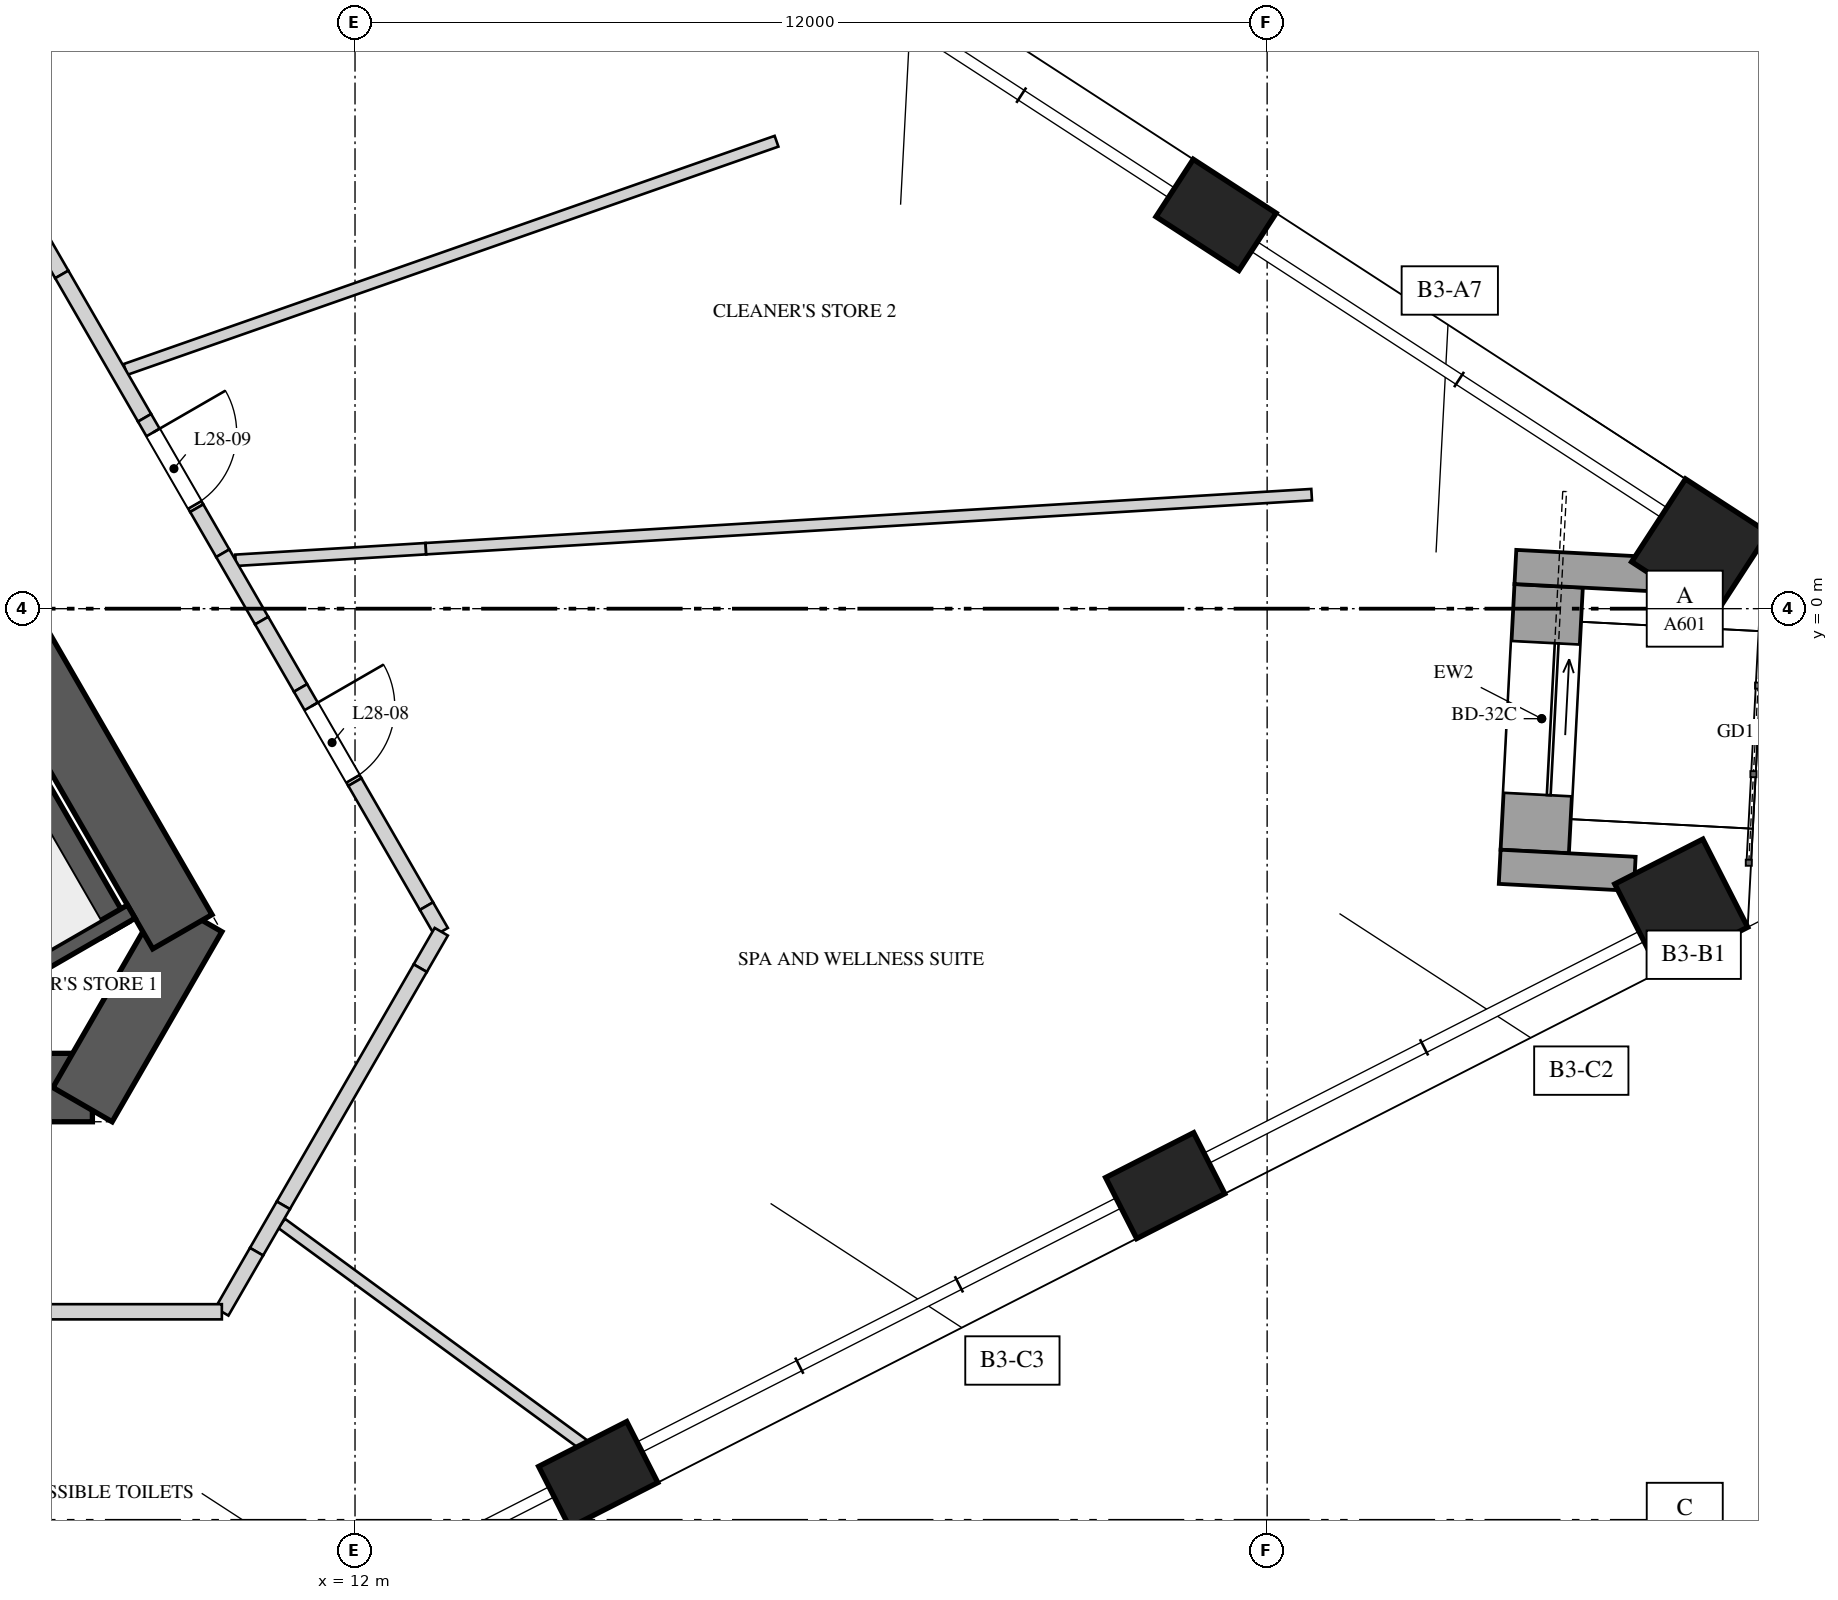
"""IFC4 building model, lengths in metres.
Left out: names, types, materials, properties, quantities, classifications, styles, units other than length and angle.
Written with IfcOpenShell. Run it as: python <this file> out.ifc"""

import sys

from ifc_helpers import new_model, si_unit, direction, frame, frame_2d, origin, origin_2d, place, context, subcontext, project, spatial, polyline, rectangle, outline, extrude, element, fill, save


model = new_model("IFC4")
c1 = context("Model", 3, precision=1e-05, world=origin(), true_north=direction((0.0, 1.0)))
c2 = subcontext(c1, "Body", "Model", "MODEL_VIEW")
j1 = project(units=[si_unit("LENGTHUNIT", "METRE"), si_unit("PLANEANGLEUNIT", "RADIAN")], contexts=[c1])
p1 = place(None, origin())
s1 = spatial("IfcSite", under=j1, at=p1, CompositionType="ELEMENT")
p2 = place(p1, origin())
s2 = spatial("IfcBuilding", under=s1, at=p2, CompositionType="ELEMENT")
p3 = place(p2, frame((0.0, 0.0, 125.6)))
s3 = spatial("IfcBuildingStorey", under=s2, at=p3, CompositionType="ELEMENT", Elevation=125.6)
p4 = place(p3, frame((-8.545, -6.3, 0.0), z_axis=(0.0, 0.0, 1.0), x_axis=(1.0, 0.0, 0.0)))
e1 = element("IfcWall", 1, at=p4, inside=s3, PredefinedType="SHEAR", context=c2, shape_type="SweptSolid", body=[
    extrude(rectangle(XDim=17.09, YDim=0.9, at=frame_2d((8.545, 0.0))), origin(), (0.0, 0.0, 1.0), 4.0),
])
p5 = place(p4, frame((6.75, 0.0, 0.0)))
e2 = element("IfcOpeningElement", 2, at=p5, cuts=e1, PredefinedType="OPENING", context=c2, shape_type="SweptSolid", body=[
    extrude(rectangle(XDim=1.0, YDim=2.4, at=frame_2d((0.5, 1.2))), frame((0.0, 0.46, 0.0), z_axis=(0.0, -1.0, 0.0), x_axis=(1.0, 0.0, 0.0)), (0.0, 0.0, 1.0), 0.92),
])
p6 = place(p4, frame((14.678, 0.0, 0.0)))
e3 = element("IfcOpeningElement", 3, at=p6, cuts=e1, PredefinedType="OPENING", context=c2, shape_type="SweptSolid", body=[
    extrude(rectangle(XDim=0.8, YDim=2.1, at=frame_2d((0.4, 1.05))), frame((0.0, 0.46, 0.0), z_axis=(0.0, -1.0, 0.0), x_axis=(1.0, 0.0, 0.0)), (0.0, 0.0, 1.0), 0.92),
])
p7 = place(p3, frame((8.415, -6.525, 0.0), z_axis=(0.0, 0.0, 1.0), x_axis=(0.500059191753, 0.865991226713, 0.0)))
e4 = element("IfcWall", 4, at=p7, inside=s3, PredefinedType="SHEAR", context=c2, shape_type="SweptSolid", body=[
    extrude(rectangle(XDim=2.887, YDim=0.9, at=frame_2d((1.443, 0.0))), origin(), (0.0, 0.0, 1.0), 4.0),
])
p8 = place(p3, frame((9.729, -4.25, 0.0), z_axis=(0.0, 0.0, 1.0), x_axis=(-0.500004814304, 0.866022624227, 0.0)))
e5 = element("IfcWall", 5, at=p8, inside=s3, PredefinedType="SHEAR", context=c2, shape_type="SweptSolid", body=[
    extrude(rectangle(XDim=17.09, YDim=0.9, at=frame_2d((8.545, 0.0))), origin(), (0.0, 0.0, 1.0), 4.0),
])
p9 = place(p8, frame((6.82, 0.0, 0.0)))
e6 = element("IfcOpeningElement", 6, at=p9, cuts=e5, PredefinedType="OPENING", context=c2, shape_type="SweptSolid", body=[
    extrude(rectangle(XDim=1.0, YDim=2.4, at=frame_2d((0.5, 1.2))), frame((0.0, 0.46, 0.0), z_axis=(0.0, -1.0, 0.0), x_axis=(1.0, 0.0, 0.0)), (0.0, 0.0, 1.0), 0.92),
])
for number, where, z_axis, x_axis in (
    (7, (15.2, -11.391, -0.35), (0.0, 0.0, 1.0), (0.891, 0.454, 0.0)),
    (8, (22.659, -7.59, -0.35), (0.0, 0.0, 1.0), (0.891, 0.454, 0.0)),
):
    element("IfcColumn", number, at=place(p3, frame(where, z_axis=z_axis, x_axis=x_axis)), inside=s3, PredefinedType="COLUMN", context=c2, shape_type="SweptSolid", body=[
        extrude(rectangle(XDim=1.3, YDim=0.9, at=origin_2d()), origin(), (0.0, 0.0, 1.0), 4.35),
    ])
for number, where, z_axis, x_axis in (
    (9, (29.448, -3.907, -0.35), (0.0, 0.0, 1.0), (0.891, 0.454, 0.0)),
    (10, (29.695, 0.807, -0.35), (0.0, 0.0, 1.0), (-0.839, 0.545, 0.0)),
):
    element("IfcColumn", number, at=place(p3, frame(where, z_axis=z_axis, x_axis=x_axis)), inside=s3, PredefinedType="COLUMN", context=c2, shape_type="SweptSolid", body=[
        extrude(rectangle(XDim=1.3, YDim=1.3, at=origin_2d()), origin(), (0.0, 0.0, 1.0), 4.35),
    ])
p10 = place(p3, frame((23.328, 5.18, -0.35), z_axis=(0.0, 0.0, 1.0), x_axis=(-0.838670567945, 0.544639035015, 0.0)))
e11 = element("IfcColumn", 11, at=p10, inside=s3, PredefinedType="COLUMN", context=c2, shape_type="SweptSolid", body=[
    extrude(rectangle(XDim=1.3, YDim=0.9, at=origin_2d()), origin(), (0.0, 0.0, 1.0), 4.35),
])
p11 = place(p3, frame((27.704, 0.301, 0.0), z_axis=(0.0, 0.0, 1.0), x_axis=(-0.052317189757, -0.998630518088, 0.0)))
e12 = element("IfcWall", 12, at=p11, inside=s3, PredefinedType="SOLIDWALL", context=c2, shape_type="SweptSolid", body=[
    extrude(rectangle(XDim=3.5, YDim=0.9, at=frame_2d((1.75, 0.0))), origin(), (0.0, 0.0, 1.0), 3.3),
])
p12 = place(p11, frame((0.75, 0.0, 0.0)))
e13 = element("IfcOpeningElement", 13, at=p12, cuts=e12, PredefinedType="OPENING", context=c2, shape_type="SweptSolid", body=[
    extrude(rectangle(XDim=2.0, YDim=2.4, at=frame_2d((1.0, 1.2))), frame((0.0, 0.46, 0.0), z_axis=(0.0, -1.0, 0.0), x_axis=(1.0, 0.0, 0.0)), (0.0, 0.0, 1.0), 0.92),
])
for number, where, z_axis, x_axis in (
    (14, (29.043, 0.456, 0.0), (0.0, 0.0, 1.0), (-0.999, 0.052, 0.0)),
    (15, (28.836, -3.489, 0.0), (0.0, 0.0, 1.0), (-0.999, 0.052, 0.0)),
):
    element("IfcWall", number, at=place(p3, frame(where, z_axis=z_axis, x_axis=x_axis)), inside=s3, PredefinedType="SOLIDWALL", context=c2, shape_type="SweptSolid", body=[
        extrude(rectangle(XDim=1.779, YDim=0.45, at=frame_2d((0.89, 0.0))), origin(), (0.0, 0.0, 1.0), 2.55),
    ])
p13 = place(p3, frame((8.846, -4.222, 0.0), z_axis=(0.0, 0.0, 1.0), x_axis=(-0.500009909098, 0.866019682689, 0.0)))
e16 = element("IfcWall", 16, at=p13, inside=s3, PredefinedType="SOLIDWALL", context=c2, shape_type="SweptSolid", body=[
    extrude(rectangle(XDim=6.2, YDim=0.4, at=frame_2d((3.1, 0.0))), origin(), (0.0, 0.0, 1.0), 3.65),
])
p14 = place(p3, frame((6.501, -5.461, 0.0), z_axis=(0.0, 0.0, 1.0), x_axis=(0.866003658127, 0.500037662692, 0.0)))
e17 = element("IfcWall", 17, at=p14, inside=s3, PredefinedType="SOLIDWALL", context=c2, shape_type="SweptSolid", body=[
    extrude(rectangle(XDim=2.95, YDim=0.2, at=frame_2d((1.475, 0.0))), origin(), (0.0, 0.0, 1.0), 3.65),
])
p15 = place(p3, frame((10.429, 0.636, 0.0), z_axis=(0.0, 0.0, 1.0), x_axis=(0.998147237078, 0.060844828165, 0.0)))
e18 = element("IfcWall", 18, at=p15, inside=s3, PredefinedType="PARTITIONING", context=c2, shape_type="SweptSolid", body=[
    extrude(rectangle(XDim=2.508, YDim=0.15, at=frame_2d((1.254, 0.0))), origin(), (0.0, 0.0, 1.0), 2.55),
])
p16 = place(p3, frame((12.932, 0.789, 0.0), z_axis=(0.0, 0.0, 1.0), x_axis=(0.998142962619, 0.060914909287, 0.0)))
e19 = element("IfcWall", 19, at=p16, inside=s3, PredefinedType="PARTITIONING", context=c2, shape_type="SweptSolid", body=[
    extrude(rectangle(XDim=11.675, YDim=0.15, at=frame_2d((5.837, 0.0))), origin(), (0.0, 0.0, 1.0), 3.65),
])
p17 = place(p3, frame((11.035, -8.087, 0.0), z_axis=(0.0, 0.0, 1.0), x_axis=(0.806587239444, -0.591115069311, 0.0)))
e20 = element("IfcWall", 20, at=p17, inside=s3, PredefinedType="PARTITIONING", context=c2, shape_type="SweptSolid", body=[
    extrude(rectangle(XDim=5.28, YDim=0.15, at=frame_2d((2.64, 0.0))), origin(), (0.0, 0.0, 1.0), 2.95),
])
p18 = place(p3, frame((17.545, 6.149, 0.0), z_axis=(0.0, 0.0, 1.0), x_axis=(-0.943716534822, -0.33075535053, 0.0)))
e21 = element("IfcWall", 21, at=p18, inside=s3, PredefinedType="PARTITIONING", context=c2, shape_type="SweptSolid", body=[
    extrude(rectangle(XDim=9.077, YDim=0.15, at=frame_2d((4.539, 0.0))), origin(), (0.0, 0.0, 1.0), 3.65),
])
p19 = place(p3, frame((7.742, 5.09, 0.0), z_axis=(0.0, 0.0, 1.0), x_axis=(0.500109828528, -0.865961984968, 0.0)))
e22 = element("IfcWall", 22, at=p19, inside=s3, PredefinedType="SOLIDWALL", context=c2, shape_type="SweptSolid", body=[
    extrude(rectangle(XDim=0.8, YDim=0.2, at=frame_2d((0.4, 0.0))), origin(), (0.0, 0.0, 1.0), 2.75),
])
p20 = place(p3, frame((8.142, 4.397, 0.0), z_axis=(0.0, 0.0, 1.0), x_axis=(0.499948868167, -0.866054922749, 0.0)))
e23 = element("IfcWall", 23, at=p20, inside=s3, PredefinedType="SOLIDWALL", context=c2, shape_type="SweptSolid", body=[
    extrude(rectangle(XDim=2.178, YDim=0.2, at=frame_2d((1.089, 0.0))), origin(), (0.0, 0.0, 1.0), 3.65),
])
p21 = place(p3, frame((9.231, 2.511, 0.0), z_axis=(0.0, 0.0, 1.0), x_axis=(0.49998419723, -0.866034527326, 0.0)))
e24 = element("IfcWall", 24, at=p21, inside=s3, PredefinedType="SOLIDWALL", context=c2, shape_type="SweptSolid", body=[
    extrude(outline(polyline([(0.0, 0.0), (1.373, 0.0), (1.373, 3.65), (0.944, 3.65), (0.944, 2.55), (0.0, 2.55), (0.0, 0.0)])), frame((0.0, 0.1, 0.0), z_axis=(0.0, -1.0, 0.0), x_axis=(1.0, 0.0, 0.0)), (0.0, 0.0, 1.0), 0.2),
])
p22 = place(p21, frame((0.223, 0.0, 0.0)))
e25 = element("IfcOpeningElement", 25, at=p22, cuts=e24, PredefinedType="OPENING", context=c2, shape_type="SweptSolid", body=[
    extrude(rectangle(XDim=1.1, YDim=2.4, at=frame_2d((0.55, 1.2))), frame((0.0, 0.11, 0.0), z_axis=(0.0, -1.0, 0.0), x_axis=(1.0, 0.0, 0.0)), (0.0, 0.0, 1.0), 0.22),
])
p23 = place(p3, frame((9.917, 1.322, 0.0), z_axis=(0.0, 0.0, 1.0), x_axis=(0.500010383074, -0.866019409031, 0.0)))
e26 = element("IfcWall", 26, at=p23, inside=s3, PredefinedType="SOLIDWALL", context=c2, shape_type="SweptSolid", body=[
    extrude(rectangle(XDim=0.685, YDim=0.2, at=frame_2d((0.343, 0.0))), origin(), (0.0, 0.0, 1.0), 3.65),
])
p24 = place(p3, frame((10.26, 0.729, 0.0), z_axis=(0.0, 0.0, 1.0), x_axis=(0.499935808259, -0.866062461731, 0.0)))
e27 = element("IfcWall", 27, at=p24, inside=s3, PredefinedType="SOLIDWALL", context=c2, shape_type="SweptSolid", body=[
    extrude(rectangle(XDim=1.024, YDim=0.2, at=frame_2d((0.512, 0.0))), origin(), (0.0, 0.0, 1.0), 2.55),
])
p25 = place(p3, frame((10.772, -0.157, 0.0), z_axis=(0.0, 0.0, 1.0), x_axis=(0.500170198676, -0.865927117231, 0.0)))
e28 = element("IfcWall", 28, at=p25, inside=s3, PredefinedType="SOLIDWALL", context=c2, shape_type="SweptSolid", body=[
    extrude(rectangle(XDim=1.023, YDim=0.2, at=frame_2d((0.511, 0.0))), origin(), (0.0, 0.0, 1.0), 3.65),
])
p26 = place(p3, frame((11.283, -1.043, 0.0), z_axis=(0.0, 0.0, 1.0), x_axis=(0.499885022602, -0.86609177584, 0.0)))
e29 = element("IfcWall", 29, at=p26, inside=s3, PredefinedType="SOLIDWALL", context=c2, shape_type="SweptSolid", body=[
    extrude(outline(polyline([(0.0, 0.0), (1.43, 0.0), (1.43, 3.65), (1.135, 3.65), (1.135, 2.55), (0.0, 2.55), (0.0, 0.0)])), frame((0.0, 0.1, 0.0), z_axis=(0.0, -1.0, 0.0), x_axis=(1.0, 0.0, 0.0)), (0.0, 0.0, 1.0), 0.2),
])
p27 = place(p26, frame((0.28, 0.0, 0.0)))
e30 = element("IfcOpeningElement", 30, at=p27, cuts=e29, PredefinedType="OPENING", context=c2, shape_type="SweptSolid", body=[
    extrude(rectangle(XDim=1.1, YDim=2.4, at=frame_2d((0.55, 1.2))), frame((0.0, 0.11, 0.0), z_axis=(0.0, -1.0, 0.0), x_axis=(1.0, 0.0, 0.0)), (0.0, 0.0, 1.0), 0.22),
])
p28 = place(p3, frame((11.998, -2.281, 0.0), z_axis=(0.0, 0.0, 1.0), x_axis=(0.500111335238, -0.865961114812, 0.0)))
e31 = element("IfcWall", 31, at=p28, inside=s3, PredefinedType="SOLIDWALL", context=c2, shape_type="SweptSolid", body=[
    extrude(rectangle(XDim=1.884, YDim=0.2, at=frame_2d((0.942, 0.0))), origin(), (0.0, 0.0, 1.0), 3.65),
])
p29 = place(p3, frame((12.94, -3.913, 0.0), z_axis=(0.0, 0.0, 1.0), x_axis=(0.499849133735, -0.866112488944, 0.0)))
e32 = element("IfcWall", 32, at=p29, inside=s3, PredefinedType="SOLIDWALL", context=c2, shape_type="SweptSolid", body=[
    extrude(rectangle(XDim=0.389, YDim=0.2, at=frame_2d((0.195, 0.0))), origin(), (0.0, 0.0, 1.0), 2.75),
])
p30 = place(p3, frame((13.135, -4.25, 0.0), z_axis=(0.0, 0.0, 1.0), x_axis=(-0.499887958344, -0.866090081402, 0.0)))
e33 = element("IfcWall", 33, at=p30, inside=s3, PredefinedType="SOLIDWALL", context=c2, shape_type="SweptSolid", body=[
    extrude(rectangle(XDim=0.553, YDim=0.2, at=frame_2d((0.277, 0.0))), origin(), (0.0, 0.0, 1.0), 2.75),
])
p31 = place(p3, frame((12.858, -4.729, 0.0), z_axis=(0.0, 0.0, 1.0), x_axis=(-0.500031425827, -0.866007259314, 0.0)))
e34 = element("IfcWall", 34, at=p31, inside=s3, PredefinedType="SOLIDWALL", context=c2, shape_type="SweptSolid", body=[
    extrude(rectangle(XDim=3.602, YDim=0.2, at=frame_2d((1.801, 0.0))), origin(), (0.0, 0.0, 1.0), 3.65),
])
p32 = place(p3, frame((11.057, -7.849, 0.0), z_axis=(0.0, 0.0, 1.0), x_axis=(-0.500012199891, -0.86601836006, 0.0)))
e35 = element("IfcWall", 35, at=p32, inside=s3, PredefinedType="SOLIDWALL", context=c2, shape_type="SweptSolid", body=[
    extrude(rectangle(XDim=0.705, YDim=0.2, at=frame_2d((0.353, 0.0))), origin(), (0.0, 0.0, 1.0), 2.95),
])
p33 = place(p3, frame((10.704, -8.459, 0.0), z_axis=(0.0, 0.0, 1.0), x_axis=(-0.499907684424, -0.866078695647, 0.0)))
e36 = element("IfcWall", 36, at=p33, inside=s3, PredefinedType="SOLIDWALL", context=c2, shape_type="SweptSolid", body=[
    extrude(rectangle(XDim=0.913, YDim=0.2, at=frame_2d((0.457, 0.0))), origin(), (0.0, 0.0, 1.0), 3.65),
])
p34 = place(p3, frame((10.248, -9.25, 0.0), z_axis=(0.0, 0.0, 1.0), x_axis=(-1.0, 0.0, 0.0)))
e37 = element("IfcWall", 37, at=p34, inside=s3, PredefinedType="SOLIDWALL", context=c2, shape_type="SweptSolid", body=[
    extrude(rectangle(XDim=5.142, YDim=0.2, at=frame_2d((2.571, 0.0))), origin(), (0.0, 0.0, 1.0), 3.65),
])
p35 = place(p34, frame((3.308, 0.0, 0.0)))
e38 = element("IfcOpeningElement", 38, at=p35, cuts=e37, PredefinedType="OPENING", context=c2, shape_type="SweptSolid", body=[
    extrude(rectangle(XDim=1.1, YDim=2.4, at=frame_2d((0.55, 1.2))), frame((0.0, 0.11, 0.0), z_axis=(0.0, -1.0, 0.0), x_axis=(1.0, 0.0, 0.0)), (0.0, 0.0, 1.0), 0.22),
])
p36 = place(p12, origin())
e39 = element("IfcDoor", 39, at=p36, inside=s3, OperationType="SLIDING_TO_LEFT", PredefinedType="DOOR", context=c2, shape_type="SweptSolid", body=[
    extrude(rectangle(XDim=2.0, YDim=2.4, at=frame_2d((1.0, 1.2))), frame((0.0, 0.025, 0.0), z_axis=(0.0, -1.0, 0.0), x_axis=(1.0, 0.0, 0.0)), (0.0, 0.0, 1.0), 0.05),
])
fill(e13, e39)
p37 = place(p27, origin())
e40 = element("IfcDoor", 40, at=p37, inside=s3, OperationType="SINGLE_SWING_RIGHT", PredefinedType="DOOR", context=c2, shape_type="SweptSolid", body=[
    extrude(rectangle(XDim=1.1, YDim=2.4, at=frame_2d((0.55, 1.2))), frame((0.0, 0.025, 0.0), z_axis=(0.0, -1.0, 0.0), x_axis=(1.0, 0.0, 0.0)), (0.0, 0.0, 1.0), 0.05),
])
fill(e30, e40)
p38 = place(p22, origin())
e41 = element("IfcDoor", 41, at=p38, inside=s3, OperationType="SINGLE_SWING_LEFT", PredefinedType="DOOR", context=c2, shape_type="SweptSolid", body=[
    extrude(rectangle(XDim=1.1, YDim=2.4, at=frame_2d((0.55, 1.2))), frame((0.0, 0.025, 0.0), z_axis=(0.0, -1.0, 0.0), x_axis=(1.0, 0.0, 0.0)), (0.0, 0.0, 1.0), 0.05),
])
fill(e25, e41)
save(model, sys.argv[1])
